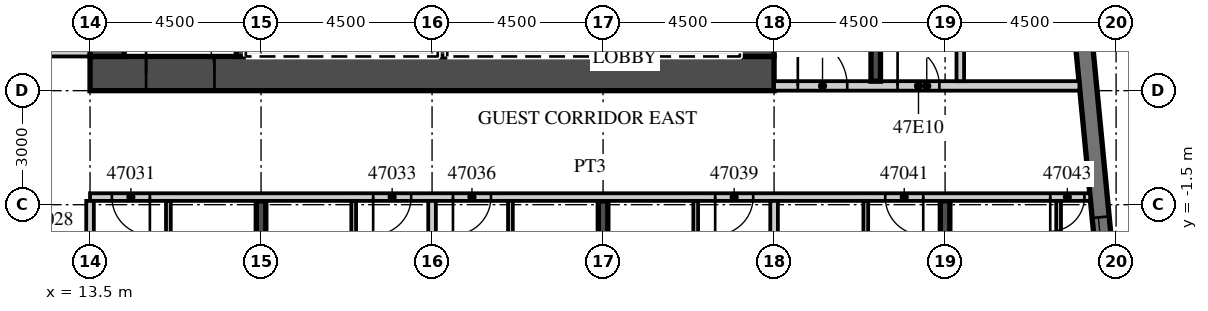
"""IFC4 building model, lengths in metres.
Left out: names, types, materials, properties, quantities, classifications, styles, units other than length and angle.
Written with IfcOpenShell. Run it as: python <this file> out.ifc"""

import sys

from ifc_helpers import new_model, si_unit, direction, frame, frame_2d, origin, place, context, subcontext, project, spatial, rectangle, extrude, element, fill, save


model = new_model("IFC4")
c1 = context("Model", 3, precision=1e-05, world=origin(), true_north=direction((0.0, 1.0)))
c2 = subcontext(c1, "Body", "Model", "MODEL_VIEW")
j1 = project(units=[si_unit("LENGTHUNIT", "METRE"), si_unit("PLANEANGLEUNIT", "RADIAN")], contexts=[c1])
p1 = place(None, origin())
s1 = spatial("IfcSite", under=j1, at=p1, CompositionType="ELEMENT")
p2 = place(p1, origin())
s2 = spatial("IfcBuilding", under=s1, at=p2, CompositionType="ELEMENT")
p3 = place(p2, frame((0.0, 0.0, 196.6)))
s3 = spatial("IfcBuildingStorey", under=s2, at=p3, CompositionType="ELEMENT", Elevation=196.6)
p4 = place(p3, frame((18.0, -19.245, 0.0), z_axis=(0.0, 0.0, 1.0), x_axis=(0.0, 1.0, 0.0)))
e1 = element("IfcWall", 1, at=p4, inside=s3, PredefinedType="SHEAR", context=c2, shape_type="SweptSolid", body=[
    extrude(rectangle(XDim=17.845, YDim=0.25, at=frame_2d((8.923, 0.0))), origin(), (0.0, 0.0, 1.0), 3.3),
])
p5 = place(p3, frame((27.0, -18.379, 0.0), z_axis=(0.0, 0.0, 1.0), x_axis=(0.0, 1.0, 0.0)))
e2 = element("IfcWall", 2, at=p5, inside=s3, PredefinedType="SHEAR", context=c2, shape_type="SweptSolid", body=[
    extrude(rectangle(XDim=16.979, YDim=0.25, at=frame_2d((8.489, 0.0))), origin(), (0.0, 0.0, 1.0), 3.3),
])
p6 = place(p3, frame((36.0, -17.512, 0.0), z_axis=(0.0, 0.0, 1.0), x_axis=(0.0, 1.0, 0.0)))
e3 = element("IfcWall", 3, at=p6, inside=s3, PredefinedType="SHEAR", context=c2, shape_type="SweptSolid", body=[
    extrude(rectangle(XDim=16.112, YDim=0.25, at=frame_2d((8.056, 0.0))), origin(), (0.0, 0.0, 1.0), 3.3),
])
p7 = place(p3, frame((41.214, -13.466, 0.0), z_axis=(0.0, 0.0, 1.0), x_axis=(-0.095847314626, 0.995396047952, 0.0)))
e4 = element("IfcWall", 4, at=p7, inside=s3, PredefinedType="SOLIDWALL", context=c2, shape_type="SweptSolid", body=[
    extrude(rectangle(XDim=34.0, YDim=0.45, at=frame_2d((17.0, 0.0))), origin(), (0.0, 0.0, 1.0), 3.02),
])
p8 = place(p7, frame((3.869, 0.0, 0.45)))
e5 = element("IfcOpeningElement", 5, at=p8, cuts=e4, PredefinedType="OPENING", context=c2, shape_type="SweptSolid", body=[
    extrude(rectangle(XDim=3.3, YDim=2.25, at=frame_2d((1.65, 1.125))), frame((0.0, 0.235, 0.0), z_axis=(0.0, -1.0, 0.0), x_axis=(1.0, 0.0, 0.0)), (0.0, 0.0, 1.0), 0.47),
])
p9 = place(p7, frame((8.39, 0.0, 0.45)))
e6 = element("IfcOpeningElement", 6, at=p9, cuts=e4, PredefinedType="OPENING", context=c2, shape_type="SweptSolid", body=[
    extrude(rectangle(XDim=3.3, YDim=2.25, at=frame_2d((1.65, 1.125))), frame((0.0, 0.235, 0.0), z_axis=(0.0, -1.0, 0.0), x_axis=(1.0, 0.0, 0.0)), (0.0, 0.0, 1.0), 0.47),
])
p10 = place(p3, frame((-13.5, 2.5, 0.0), z_axis=(0.0, 0.0, 1.0), x_axis=(1.0, 0.0, 0.0)))
e7 = element("IfcWall", 7, at=p10, inside=s3, PredefinedType="PARTITIONING", context=c2, shape_type="SweptSolid", body=[
    extrude(rectangle(XDim=27.0, YDim=0.2, at=frame_2d((13.5, 0.0))), origin(), (0.0, 0.0, 1.0), 3.02),
])
p11 = place(p10, frame((0.575, 0.0, 0.0)))
e8 = element("IfcOpeningElement", 8, at=p11, cuts=e7, PredefinedType="OPENING", context=c2, shape_type="SweptSolid", body=[
    extrude(rectangle(XDim=1.0, YDim=2.1, at=frame_2d((0.5, 1.05))), frame((0.0, 0.11, 0.0), z_axis=(0.0, -1.0, 0.0), x_axis=(1.0, 0.0, 0.0)), (0.0, 0.0, 1.0), 0.22),
])
p12 = place(p10, frame((9.863, 0.0, 0.0)))
e9 = element("IfcOpeningElement", 9, at=p12, cuts=e7, PredefinedType="OPENING", context=c2, shape_type="SweptSolid", body=[
    extrude(rectangle(XDim=1.2, YDim=2.1, at=frame_2d((0.6, 1.05))), frame((0.0, 0.11, 0.0), z_axis=(0.0, -1.0, 0.0), x_axis=(1.0, 0.0, 0.0)), (0.0, 0.0, 1.0), 0.22),
])
p13 = place(p10, frame((14.075, 0.0, 0.0)))
e10 = element("IfcOpeningElement", 10, at=p13, cuts=e7, PredefinedType="OPENING", context=c2, shape_type="SweptSolid", body=[
    extrude(rectangle(XDim=1.0, YDim=2.1, at=frame_2d((0.5, 1.05))), frame((0.0, 0.11, 0.0), z_axis=(0.0, -1.0, 0.0), x_axis=(1.0, 0.0, 0.0)), (0.0, 0.0, 1.0), 0.22),
])
p14 = place(p10, frame((18.55, 0.0, 0.0)))
e11 = element("IfcOpeningElement", 11, at=p14, cuts=e7, PredefinedType="OPENING", context=c2, shape_type="SweptSolid", body=[
    extrude(rectangle(XDim=1.0, YDim=2.1, at=frame_2d((0.5, 1.05))), frame((0.0, 0.11, 0.0), z_axis=(0.0, -1.0, 0.0), x_axis=(1.0, 0.0, 0.0)), (0.0, 0.0, 1.0), 0.22),
])
p15 = place(p10, frame((23.075, 0.0, 0.0)))
e12 = element("IfcOpeningElement", 12, at=p15, cuts=e7, PredefinedType="OPENING", context=c2, shape_type="SweptSolid", body=[
    extrude(rectangle(XDim=1.0, YDim=2.1, at=frame_2d((0.5, 1.05))), frame((0.0, 0.11, 0.0), z_axis=(0.0, -1.0, 0.0), x_axis=(1.0, 0.0, 0.0)), (0.0, 0.0, 1.0), 0.22),
])
p16 = place(p3, frame((13.5, -1.3, 0.0), z_axis=(0.0, 0.0, 1.0), x_axis=(1.0, 0.0, 0.0)))
e13 = element("IfcWall", 13, at=p16, inside=s3, PredefinedType="PARTITIONING", context=c2, shape_type="SweptSolid", body=[
    extrude(rectangle(XDim=26.317, YDim=0.2, at=frame_2d((13.158, 0.0))), origin(), (0.0, 0.0, 1.0), 3.02),
])
p17 = place(p16, frame((0.575, 0.0, 0.0)))
e14 = element("IfcOpeningElement", 14, at=p17, cuts=e13, PredefinedType="OPENING", context=c2, shape_type="SweptSolid", body=[
    extrude(rectangle(XDim=1.0, YDim=2.1, at=frame_2d((0.5, 1.05))), frame((0.0, 0.11, 0.0), z_axis=(0.0, -1.0, 0.0), x_axis=(1.0, 0.0, 0.0)), (0.0, 0.0, 1.0), 0.22),
])
p18 = place(p16, frame((7.45, 0.0, 0.0)))
e15 = element("IfcOpeningElement", 15, at=p18, cuts=e13, PredefinedType="OPENING", context=c2, shape_type="SweptSolid", body=[
    extrude(rectangle(XDim=1.0, YDim=2.1, at=frame_2d((0.5, 1.05))), frame((0.0, 0.11, 0.0), z_axis=(0.0, -1.0, 0.0), x_axis=(1.0, 0.0, 0.0)), (0.0, 0.0, 1.0), 0.22),
])
p19 = place(p16, frame((9.55, 0.0, 0.0)))
e16 = element("IfcOpeningElement", 16, at=p19, cuts=e13, PredefinedType="OPENING", context=c2, shape_type="SweptSolid", body=[
    extrude(rectangle(XDim=1.0, YDim=2.1, at=frame_2d((0.5, 1.05))), frame((0.0, 0.11, 0.0), z_axis=(0.0, -1.0, 0.0), x_axis=(1.0, 0.0, 0.0)), (0.0, 0.0, 1.0), 0.22),
])
p20 = place(p16, frame((16.45, 0.0, 0.0)))
e17 = element("IfcOpeningElement", 17, at=p20, cuts=e13, PredefinedType="OPENING", context=c2, shape_type="SweptSolid", body=[
    extrude(rectangle(XDim=1.0, YDim=2.1, at=frame_2d((0.5, 1.05))), frame((0.0, 0.11, 0.0), z_axis=(0.0, -1.0, 0.0), x_axis=(1.0, 0.0, 0.0)), (0.0, 0.0, 1.0), 0.22),
])
p21 = place(p16, frame((20.925, 0.0, 0.0)))
e18 = element("IfcOpeningElement", 18, at=p21, cuts=e13, PredefinedType="OPENING", context=c2, shape_type="SweptSolid", body=[
    extrude(rectangle(XDim=1.0, YDim=2.1, at=frame_2d((0.5, 1.05))), frame((0.0, 0.11, 0.0), z_axis=(0.0, -1.0, 0.0), x_axis=(1.0, 0.0, 0.0)), (0.0, 0.0, 1.0), 0.22),
])
p22 = place(p16, frame((25.267, 0.0, 0.0)))
e19 = element("IfcOpeningElement", 19, at=p22, cuts=e13, PredefinedType="OPENING", context=c2, shape_type="SweptSolid", body=[
    extrude(rectangle(XDim=0.9, YDim=2.1, at=frame_2d((0.45, 1.05))), frame((0.0, 0.11, 0.0), z_axis=(0.0, -1.0, 0.0), x_axis=(1.0, 0.0, 0.0)), (0.0, 0.0, 1.0), 0.22),
])
p23 = place(p3, frame((13.5, -19.701, 0.0), z_axis=(0.0, 0.0, 1.0), x_axis=(0.0, 1.0, 0.0)))
e20 = element("IfcWall", 20, at=p23, inside=s3, PredefinedType="PARTITIONING", context=c2, shape_type="SweptSolid", body=[
    extrude(rectangle(XDim=18.301, YDim=0.2, at=frame_2d((9.15, 0.0))), origin(), (0.0, 0.0, 1.0), 3.02),
])
p24 = place(p3, frame((15.562, -8.625, 0.0), z_axis=(0.0, 0.0, 1.0), x_axis=(0.0, 1.0, 0.0)))
e21 = element("IfcWall", 21, at=p24, inside=s3, PredefinedType="PARTITIONING", context=c2, shape_type="SweptSolid", body=[
    extrude(rectangle(XDim=7.225, YDim=0.125, at=frame_2d((3.613, 0.0))), origin(), (0.0, 0.0, 1.0), 3.02),
])
p25 = place(p24, frame((3.875, 0.0, 0.0)))
e22 = element("IfcOpeningElement", 22, at=p25, cuts=e21, PredefinedType="OPENING", context=c2, shape_type="SweptSolid", body=[
    extrude(rectangle(XDim=0.9, YDim=2.1, at=frame_2d((0.45, 1.05))), frame((0.0, 0.073, 0.0), z_axis=(0.0, -1.0, 0.0), x_axis=(1.0, 0.0, 0.0)), (0.0, 0.0, 1.0), 0.145),
])
p26 = place(p3, frame((22.5, -18.834, 0.0), z_axis=(0.0, 0.0, 1.0), x_axis=(0.0, 1.0, 0.0)))
e23 = element("IfcWall", 23, at=p26, inside=s3, PredefinedType="PARTITIONING", context=c2, shape_type="SweptSolid", body=[
    extrude(rectangle(XDim=17.434, YDim=0.2, at=frame_2d((8.717, 0.0))), origin(), (0.0, 0.0, 1.0), 3.02),
])
p27 = place(p3, frame((20.438, -8.625, 0.0), z_axis=(0.0, 0.0, 1.0), x_axis=(0.0, 1.0, 0.0)))
e24 = element("IfcWall", 24, at=p27, inside=s3, PredefinedType="PARTITIONING", context=c2, shape_type="SweptSolid", body=[
    extrude(rectangle(XDim=7.225, YDim=0.125, at=frame_2d((3.613, 0.0))), origin(), (0.0, 0.0, 1.0), 3.02),
])
p28 = place(p27, frame((3.875, 0.0, 0.0)))
e25 = element("IfcOpeningElement", 25, at=p28, cuts=e24, PredefinedType="OPENING", context=c2, shape_type="SweptSolid", body=[
    extrude(rectangle(XDim=0.9, YDim=2.1, at=frame_2d((0.45, 1.05))), frame((0.0, 0.073, 0.0), z_axis=(0.0, -1.0, 0.0), x_axis=(1.0, 0.0, 0.0)), (0.0, 0.0, 1.0), 0.145),
])
p29 = place(p3, frame((24.562, -8.625, 0.0), z_axis=(0.0, 0.0, 1.0), x_axis=(0.0, 1.0, 0.0)))
e26 = element("IfcWall", 26, at=p29, inside=s3, PredefinedType="PARTITIONING", context=c2, shape_type="SweptSolid", body=[
    extrude(rectangle(XDim=7.225, YDim=0.125, at=frame_2d((3.613, 0.0))), origin(), (0.0, 0.0, 1.0), 3.02),
])
p30 = place(p29, frame((3.875, 0.0, 0.0)))
e27 = element("IfcOpeningElement", 27, at=p30, cuts=e26, PredefinedType="OPENING", context=c2, shape_type="SweptSolid", body=[
    extrude(rectangle(XDim=0.9, YDim=2.1, at=frame_2d((0.45, 1.05))), frame((0.0, 0.073, 0.0), z_axis=(0.0, -1.0, 0.0), x_axis=(1.0, 0.0, 0.0)), (0.0, 0.0, 1.0), 0.145),
])
p31 = place(p3, frame((31.5, -17.967, 0.0), z_axis=(0.0, 0.0, 1.0), x_axis=(0.0, 1.0, 0.0)))
e28 = element("IfcWall", 28, at=p31, inside=s3, PredefinedType="PARTITIONING", context=c2, shape_type="SweptSolid", body=[
    extrude(rectangle(XDim=16.567, YDim=0.2, at=frame_2d((8.284, 0.0))), origin(), (0.0, 0.0, 1.0), 3.02),
])
p32 = place(p3, frame((29.438, -8.625, 0.0), z_axis=(0.0, 0.0, 1.0), x_axis=(0.0, 1.0, 0.0)))
e29 = element("IfcWall", 29, at=p32, inside=s3, PredefinedType="PARTITIONING", context=c2, shape_type="SweptSolid", body=[
    extrude(rectangle(XDim=7.225, YDim=0.125, at=frame_2d((3.613, 0.0))), origin(), (0.0, 0.0, 1.0), 3.02),
])
p33 = place(p32, frame((3.875, 0.0, 0.0)))
e30 = element("IfcOpeningElement", 30, at=p33, cuts=e29, PredefinedType="OPENING", context=c2, shape_type="SweptSolid", body=[
    extrude(rectangle(XDim=0.9, YDim=2.1, at=frame_2d((0.45, 1.05))), frame((0.0, 0.073, 0.0), z_axis=(0.0, -1.0, 0.0), x_axis=(1.0, 0.0, 0.0)), (0.0, 0.0, 1.0), 0.145),
])
p34 = place(p3, frame((33.913, -8.625, 0.0), z_axis=(0.0, 0.0, 1.0), x_axis=(0.0, 1.0, 0.0)))
e31 = element("IfcWall", 31, at=p34, inside=s3, PredefinedType="PARTITIONING", context=c2, shape_type="SweptSolid", body=[
    extrude(rectangle(XDim=7.225, YDim=0.125, at=frame_2d((3.613, 0.0))), origin(), (0.0, 0.0, 1.0), 3.02),
])
p35 = place(p34, frame((3.875, 0.0, 0.0)))
e32 = element("IfcOpeningElement", 32, at=p35, cuts=e31, PredefinedType="OPENING", context=c2, shape_type="SweptSolid", body=[
    extrude(rectangle(XDim=0.9, YDim=2.1, at=frame_2d((0.45, 1.05))), frame((0.0, 0.073, 0.0), z_axis=(0.0, -1.0, 0.0), x_axis=(1.0, 0.0, 0.0)), (0.0, 0.0, 1.0), 0.145),
])
p36 = place(p3, frame((38.987, -6.445, 0.0), z_axis=(0.0, 0.0, 1.0), x_axis=(0.0, 1.0, 0.0)))
e33 = element("IfcWall", 33, at=p36, inside=s3, PredefinedType="PARTITIONING", context=c2, shape_type="SweptSolid", body=[
    extrude(rectangle(XDim=5.045, YDim=0.125, at=frame_2d((2.522, 0.0))), origin(), (0.0, 0.0, 1.0), 3.02),
])
p37 = place(p36, frame((1.695, 0.0, 0.0)))
e34 = element("IfcOpeningElement", 34, at=p37, cuts=e33, PredefinedType="OPENING", context=c2, shape_type="SweptSolid", body=[
    extrude(rectangle(XDim=0.9, YDim=2.1, at=frame_2d((0.45, 1.05))), frame((0.0, 0.073, 0.0), z_axis=(0.0, -1.0, 0.0), x_axis=(1.0, 0.0, 0.0)), (0.0, 0.0, 1.0), 0.145),
])
p38 = place(p3, frame((13.5, 1.95, 0.0), z_axis=(0.0, 0.0, 1.0), x_axis=(1.0, 0.0, 0.0)))
e35 = element("IfcWall", 35, at=p38, inside=s3, PredefinedType="SHEAR", context=c2, shape_type="SweptSolid", body=[
    extrude(rectangle(XDim=18.0, YDim=0.9, at=frame_2d((9.0, 0.0))), origin(), (0.0, 0.0, 1.0), 3.02),
])
p39 = place(p38, frame((1.475, 0.0, 0.0)))
e36 = element("IfcOpeningElement", 36, at=p39, cuts=e35, PredefinedType="OPENING", context=c2, shape_type="SweptSolid", body=[
    extrude(rectangle(XDim=1.8, YDim=2.1, at=frame_2d((0.9, 1.05))), frame((0.0, 0.46, 0.0), z_axis=(0.0, -1.0, 0.0), x_axis=(1.0, 0.0, 0.0)), (0.0, 0.0, 1.0), 0.92),
])
p40 = place(p3, frame((31.05, 2.4, 0.0), z_axis=(0.0, 0.0, 1.0), x_axis=(0.0, 1.0, 0.0)))
e37 = element("IfcWall", 37, at=p40, inside=s3, PredefinedType="SHEAR", context=c2, shape_type="SweptSolid", body=[
    extrude(rectangle(XDim=12.8, YDim=0.9, at=frame_2d((6.4, 0.0))), origin(), (0.0, 0.0, 1.0), 3.02),
])
p41 = place(p40, frame((0.2, 0.0, 0.0)))
e38 = element("IfcOpeningElement", 38, at=p41, cuts=e37, PredefinedType="OPENING", context=c2, shape_type="SweptSolid", body=[
    extrude(rectangle(XDim=1.1, YDim=2.1, at=frame_2d((0.55, 1.05))), frame((0.0, 0.46, 0.0), z_axis=(0.0, -1.0, 0.0), x_axis=(1.0, 0.0, 0.0)), (0.0, 0.0, 1.0), 0.92),
])
p42 = place(p3, frame((13.95, 2.4, 0.0), z_axis=(0.0, 0.0, 1.0), x_axis=(0.0, 1.0, 0.0)))
e39 = element("IfcWall", 39, at=p42, inside=s3, PredefinedType="SHEAR", context=c2, shape_type="SweptSolid", body=[
    extrude(rectangle(XDim=12.2, YDim=0.9, at=frame_2d((6.1, 0.0))), origin(), (0.0, 0.0, 1.0), 3.02),
])
p43 = place(p3, frame((17.475, 2.4, 0.0), z_axis=(0.0, 0.0, 1.0), x_axis=(0.0, 1.0, 0.0)))
e40 = element("IfcWall", 40, at=p43, inside=s3, PredefinedType="SHEAR", context=c2, shape_type="SweptSolid", body=[
    extrude(rectangle(XDim=3.15, YDim=0.25, at=frame_2d((1.575, 0.0))), origin(), (0.0, 0.0, 1.0), 3.02),
])
for number, where, z_axis, x_axis in (
    (41, (27.975, 2.4, 0.0), (0.0, 0.0, 1.0), (0.0, 1.0, 0.0)),
    (42, (22.775, 2.4, 0.0), (0.0, 0.0, 1.0), (0.0, 1.0, 0.0)),
):
    element("IfcWall", number, at=place(p3, frame(where, z_axis=z_axis, x_axis=x_axis)), inside=s3, PredefinedType="SHEAR", context=c2, shape_type="SweptSolid", body=[
        extrude(rectangle(XDim=2.9, YDim=0.25, at=frame_2d((1.45, 0.0))), origin(), (0.0, 0.0, 1.0), 3.02),
    ])
p44 = place(p3, frame((31.5, 1.625, 0.0), z_axis=(0.0, 0.0, 1.0), x_axis=(1.0, 0.0, 0.0)))
e43 = element("IfcWall", 43, at=p44, inside=s3, PredefinedType="PARTITIONING", context=c2, shape_type="SweptSolid", body=[
    extrude(rectangle(XDim=8.035, YDim=0.25, at=frame_2d((4.018, 0.0))), origin(), (0.0, 0.0, 1.0), 3.02),
])
p45 = place(p44, frame((0.625, 0.0, 0.0)))
e44 = element("IfcOpeningElement", 44, at=p45, cuts=e43, PredefinedType="OPENING", context=c2, shape_type="SweptSolid", body=[
    extrude(rectangle(XDim=1.3, YDim=2.1, at=frame_2d((0.65, 1.05))), frame((0.0, 0.135, 0.0), z_axis=(0.0, -1.0, 0.0), x_axis=(1.0, 0.0, 0.0)), (0.0, 0.0, 1.0), 0.27),
])
p46 = place(p44, frame((3.25, 0.0, 0.0)))
e45 = element("IfcOpeningElement", 45, at=p46, cuts=e43, PredefinedType="OPENING", context=c2, shape_type="SweptSolid", body=[
    extrude(rectangle(XDim=1.1, YDim=2.1, at=frame_2d((0.55, 1.05))), frame((0.0, 0.135, 0.0), z_axis=(0.0, -1.0, 0.0), x_axis=(1.0, 0.0, 0.0)), (0.0, 0.0, 1.0), 0.27),
])
p47 = place(p3, frame((34.175, 1.75, 0.0), z_axis=(0.0, 0.0, 1.0), x_axis=(0.0, 1.0, 0.0)))
e46 = element("IfcWall", 46, at=p47, inside=s3, PredefinedType="SHEAR", context=c2, shape_type="SweptSolid", body=[
    extrude(rectangle(XDim=8.35, YDim=0.25, at=frame_2d((4.175, 0.0))), origin(), (0.0, 0.0, 1.0), 3.02),
])
p48 = place(p3, frame((36.4, 1.75, 0.0), z_axis=(0.0, 0.0, 1.0), x_axis=(0.0, 1.0, 0.0)))
e47 = element("IfcWall", 47, at=p48, inside=s3, PredefinedType="PARTITIONING", context=c2, shape_type="SweptSolid", body=[
    extrude(rectangle(XDim=15.95, YDim=0.2, at=frame_2d((7.975, 0.0))), origin(), (0.0, 0.0, 1.0), 3.02),
])
p49 = place(p48, frame((14.7, 0.0, 0.0)))
e48 = element("IfcOpeningElement", 48, at=p49, cuts=e47, PredefinedType="OPENING", context=c2, shape_type="SweptSolid", body=[
    extrude(rectangle(XDim=0.9, YDim=2.1, at=frame_2d((0.45, 1.05))), frame((0.0, 0.11, 0.0), z_axis=(0.0, -1.0, 0.0), x_axis=(1.0, 0.0, 0.0)), (0.0, 0.0, 1.0), 0.22),
])
p50 = place(p9, origin())
e49 = element("IfcWindow", 49, at=p50, inside=s3, PartitioningType="SINGLE_PANEL", PredefinedType="WINDOW", context=c2, shape_type="SweptSolid", body=[
    extrude(rectangle(XDim=3.3, YDim=2.25, at=frame_2d((1.65, 1.125))), frame((0.0, 0.09, 0.0), z_axis=(0.0, -1.0, 0.0), x_axis=(1.0, 0.0, 0.0)), (0.0, 0.0, 1.0), 0.06),
])
fill(e6, e49)
p51 = place(p17, origin())
e50 = element("IfcDoor", 50, at=p51, inside=s3, OperationType="SINGLE_SWING_RIGHT", PredefinedType="DOOR", context=c2, shape_type="SweptSolid", body=[
    extrude(rectangle(XDim=1.0, YDim=2.1, at=frame_2d((0.5, 1.05))), frame((0.0, 0.025, 0.0), z_axis=(0.0, -1.0, 0.0), x_axis=(1.0, 0.0, 0.0)), (0.0, 0.0, 1.0), 0.05),
])
fill(e14, e50)
p52 = place(p18, origin())
e51 = element("IfcDoor", 51, at=p52, inside=s3, OperationType="SINGLE_SWING_LEFT", PredefinedType="DOOR", context=c2, shape_type="SweptSolid", body=[
    extrude(rectangle(XDim=1.0, YDim=2.1, at=frame_2d((0.5, 1.05))), frame((0.0, 0.025, 0.0), z_axis=(0.0, -1.0, 0.0), x_axis=(1.0, 0.0, 0.0)), (0.0, 0.0, 1.0), 0.05),
])
fill(e15, e51)
p53 = place(p19, origin())
e52 = element("IfcDoor", 52, at=p53, inside=s3, OperationType="SINGLE_SWING_LEFT", PredefinedType="DOOR", context=c2, shape_type="SweptSolid", body=[
    extrude(rectangle(XDim=1.0, YDim=2.1, at=frame_2d((0.5, 1.05))), frame((0.0, 0.025, 0.0), z_axis=(0.0, -1.0, 0.0), x_axis=(1.0, 0.0, 0.0)), (0.0, 0.0, 1.0), 0.05),
])
fill(e16, e52)
p54 = place(p20, origin())
e53 = element("IfcDoor", 53, at=p54, inside=s3, OperationType="SINGLE_SWING_LEFT", PredefinedType="DOOR", context=c2, shape_type="SweptSolid", body=[
    extrude(rectangle(XDim=1.0, YDim=2.1, at=frame_2d((0.5, 1.05))), frame((0.0, 0.025, 0.0), z_axis=(0.0, -1.0, 0.0), x_axis=(1.0, 0.0, 0.0)), (0.0, 0.0, 1.0), 0.05),
])
fill(e17, e53)
p55 = place(p21, origin())
e54 = element("IfcDoor", 54, at=p55, inside=s3, OperationType="SINGLE_SWING_RIGHT", PredefinedType="DOOR", context=c2, shape_type="SweptSolid", body=[
    extrude(rectangle(XDim=1.0, YDim=2.1, at=frame_2d((0.5, 1.05))), frame((0.0, 0.025, 0.0), z_axis=(0.0, -1.0, 0.0), x_axis=(1.0, 0.0, 0.0)), (0.0, 0.0, 1.0), 0.05),
])
fill(e18, e54)
p56 = place(p22, origin())
e55 = element("IfcDoor", 55, at=p56, inside=s3, OperationType="SINGLE_SWING_LEFT", PredefinedType="DOOR", context=c2, shape_type="SweptSolid", body=[
    extrude(rectangle(XDim=0.9, YDim=2.1, at=frame_2d((0.45, 1.05))), frame((0.0, 0.025, 0.0), z_axis=(0.0, -1.0, 0.0), x_axis=(1.0, 0.0, 0.0)), (0.0, 0.0, 1.0), 0.05),
])
fill(e19, e55)
p57 = place(p39, origin())
e56 = element("IfcDoor", 56, at=p57, inside=s3, OperationType="DOUBLE_DOOR_DOUBLE_SWING", PredefinedType="DOOR", context=c2, shape_type="SweptSolid", body=[
    extrude(rectangle(XDim=1.8, YDim=2.1, at=frame_2d((0.9, 1.05))), frame((0.0, 0.025, 0.0), z_axis=(0.0, -1.0, 0.0), x_axis=(1.0, 0.0, 0.0)), (0.0, 0.0, 1.0), 0.05),
])
fill(e36, e56)
p58 = place(p45, origin())
e57 = element("IfcDoor", 57, at=p58, inside=s3, OperationType="SINGLE_SWING_LEFT", PredefinedType="DOOR", context=c2, shape_type="SweptSolid", body=[
    extrude(rectangle(XDim=1.3, YDim=2.1, at=frame_2d((0.65, 1.05))), frame((0.0, 0.025, 0.0), z_axis=(0.0, -1.0, 0.0), x_axis=(1.0, 0.0, 0.0)), (0.0, 0.0, 1.0), 0.05),
])
fill(e44, e57)
p59 = place(p46, origin())
e58 = element("IfcDoor", 58, at=p59, inside=s3, OperationType="SINGLE_SWING_LEFT", PredefinedType="DOOR", context=c2, shape_type="SweptSolid", body=[
    extrude(rectangle(XDim=1.1, YDim=2.1, at=frame_2d((0.55, 1.05))), frame((0.0, 0.025, 0.0), z_axis=(0.0, -1.0, 0.0), x_axis=(1.0, 0.0, 0.0)), (0.0, 0.0, 1.0), 0.05),
])
fill(e45, e58)
save(model, sys.argv[1])
